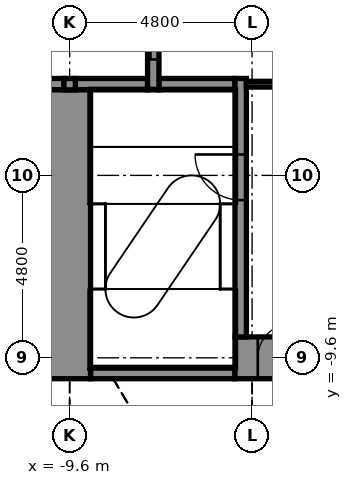
"""IFC4 building model, lengths in metres.
Left out: names, types, materials, properties, quantities, classifications, styles, units other than length and angle.
Written with IfcOpenShell. Run it as: python <this file> out.ifc"""

import sys

from ifc_helpers import new_model, si_unit, direction, frame, frame_2d, origin, place, context, subcontext, project, spatial, rectangle, extrude, element, fill, save


model = new_model("IFC4")
c1 = context("Model", 3, precision=1e-05, world=origin(), true_north=direction((0.0, 1.0)))
c2 = subcontext(c1, "Body", "Model", "MODEL_VIEW")
j1 = project(units=[si_unit("LENGTHUNIT", "METRE"), si_unit("PLANEANGLEUNIT", "RADIAN")], contexts=[c1])
p1 = place(None, origin())
s1 = spatial("IfcSite", under=j1, at=p1, CompositionType="ELEMENT")
p2 = place(p1, origin())
s2 = spatial("IfcBuilding", under=s1, at=p2, CompositionType="ELEMENT")
p3 = place(p2, frame((0.0, 0.0, 71.9)))
s3 = spatial("IfcBuildingStorey", under=s2, at=p3, CompositionType="ELEMENT", Elevation=71.9)
p4 = place(p3, frame((-9.05, -10.0, -0.3), z_axis=(0.0, 0.0, 1.0), x_axis=(1.0, 0.0, 0.0)))
e1 = element("IfcWall", 1, at=p4, inside=s3, PredefinedType="STANDARD", context=c2, shape_type="SweptSolid", body=[
    extrude(rectangle(XDim=3.8, YDim=0.3, at=frame_2d((1.9, 0.0))), origin(), (0.0, 0.0, 1.0), 6.1),
])
p5 = place(p3, frame((-5.25, -9.6, -0.3), z_axis=(0.0, 0.0, 1.0), x_axis=(1.0, 0.0, 0.0)))
e2 = element("IfcWall", 2, at=p5, inside=s3, PredefinedType="SHEAR", context=c2, shape_type="SweptSolid", body=[
    extrude(rectangle(XDim=10.2, YDim=1.1, at=frame_2d((5.1, 0.0))), origin(), (0.0, 0.0, 1.0), 6.1),
])
p6 = place(p5, frame((0.6, 0.0, 0.3)))
e3 = element("IfcOpeningElement", 3, at=p6, cuts=e2, PredefinedType="OPENING", context=c2, shape_type="SweptSolid", body=[
    extrude(rectangle(XDim=0.9, YDim=2.1, at=frame_2d((0.45, 1.05))), frame((0.0, 0.56, 0.0), z_axis=(0.0, -1.0, 0.0), x_axis=(1.0, 0.0, 0.0)), (0.0, 0.0, 1.0), 1.12),
])
p7 = place(p3, frame((-10.85, -2.4, -0.3), z_axis=(0.0, 0.0, 1.0), x_axis=(1.0, 0.0, 0.0)))
e4 = element("IfcWall", 4, at=p7, inside=s3, PredefinedType="STANDARD", context=c2, shape_type="SweptSolid", body=[
    extrude(rectangle(XDim=1.1, YDim=0.3, at=frame_2d((0.55, 0.0))), origin(), (0.0, 0.0, 1.0), 6.1),
])
p8 = place(p3, frame((-9.45, -2.4, -0.3), z_axis=(0.0, 0.0, 1.0), x_axis=(1.0, 0.0, 0.0)))
e5 = element("IfcWall", 5, at=p8, inside=s3, PredefinedType="STANDARD", context=c2, shape_type="SweptSolid", body=[
    extrude(rectangle(XDim=1.9, YDim=0.3, at=frame_2d((0.95, 0.0))), origin(), (0.0, 0.0, 1.0), 6.1),
])
p9 = place(p3, frame((-7.25, -2.4, -0.3), z_axis=(0.0, 0.0, 1.0), x_axis=(1.0, 0.0, 0.0)))
e6 = element("IfcWall", 6, at=p9, inside=s3, PredefinedType="STANDARD", context=c2, shape_type="SweptSolid", body=[
    extrude(rectangle(XDim=2.0, YDim=0.3, at=frame_2d((1.0, 0.0))), origin(), (0.0, 0.0, 1.0), 6.1),
])
p10 = place(p3, frame((-9.6, -10.15, -0.3), z_axis=(0.0, 0.0, 1.0), x_axis=(0.0, 1.0, 0.0)))
e7 = element("IfcWall", 7, at=p10, inside=s3, PredefinedType="SHEAR", context=c2, shape_type="SweptSolid", body=[
    extrude(rectangle(XDim=7.6, YDim=1.1, at=frame_2d((3.8, 0.0))), origin(), (0.0, 0.0, 1.0), 6.1),
])
p11 = place(p3, frame((-9.6, -2.55, -0.3), z_axis=(0.0, 0.0, 1.0), x_axis=(0.0, 1.0, 0.0)))
e8 = element("IfcWall", 8, at=p11, inside=s3, PredefinedType="STANDARD", context=c2, shape_type="SweptSolid", body=[
    extrude(rectangle(XDim=0.3, YDim=0.3, at=frame_2d((0.15, 0.0))), origin(), (0.0, 0.0, 1.0), 6.1),
])
p12 = place(p3, frame((-7.4, -2.55, -0.3), z_axis=(0.0, 0.0, 1.0), x_axis=(0.0, 1.0, 0.0)))
e9 = element("IfcWall", 9, at=p12, inside=s3, PredefinedType="STANDARD", context=c2, shape_type="SweptSolid", body=[
    extrude(rectangle(XDim=5.1, YDim=0.3, at=frame_2d((2.55, 0.0))), origin(), (0.0, 0.0, 1.0), 6.1),
])
p13 = place(p12, frame((0.8, 0.0, 0.3)))
e10 = element("IfcOpeningElement", 10, at=p13, cuts=e9, PredefinedType="OPENING", context=c2, shape_type="SweptSolid", body=[
    extrude(rectangle(XDim=1.1, YDim=2.1, at=frame_2d((0.55, 1.05))), frame((0.0, 0.16, 0.0), z_axis=(0.0, -1.0, 0.0), x_axis=(1.0, 0.0, 0.0)), (0.0, 0.0, 1.0), 0.32),
])
p14 = place(p12, frame((3.2, 0.0, 0.3)))
e11 = element("IfcOpeningElement", 11, at=p14, cuts=e9, PredefinedType="OPENING", context=c2, shape_type="SweptSolid", body=[
    extrude(rectangle(XDim=1.1, YDim=2.1, at=frame_2d((0.55, 1.05))), frame((0.0, 0.16, 0.0), z_axis=(0.0, -1.0, 0.0), x_axis=(1.0, 0.0, 0.0)), (0.0, 0.0, 1.0), 0.32),
])
p15 = place(p3, frame((-5.1, -9.05, -0.3), z_axis=(0.0, 0.0, 1.0), x_axis=(0.0, 1.0, 0.0)))
e12 = element("IfcWall", 12, at=p15, inside=s3, PredefinedType="STANDARD", context=c2, shape_type="SweptSolid", body=[
    extrude(rectangle(XDim=6.8, YDim=0.3, at=frame_2d((3.4, 0.0))), origin(), (0.0, 0.0, 1.0), 6.1),
])
p16 = place(p15, frame((3.6, 0.0, 0.3)))
e13 = element("IfcOpeningElement", 13, at=p16, cuts=e12, PredefinedType="OPENING", context=c2, shape_type="SweptSolid", body=[
    extrude(rectangle(XDim=1.2, YDim=2.1, at=frame_2d((0.6, 1.05))), frame((0.0, 0.16, 0.0), z_axis=(0.0, -1.0, 0.0), x_axis=(1.0, 0.0, 0.0)), (0.0, 0.0, 1.0), 0.32),
])
p17 = place(p3, frame((-4.95, -2.4, 0.0), z_axis=(0.0, 0.0, 1.0), x_axis=(1.0, 0.0, 0.0)))
e14 = element("IfcWall", 14, at=p17, inside=s3, PredefinedType="PARTITIONING", context=c2, shape_type="SweptSolid", body=[
    extrude(rectangle(XDim=1.2, YDim=0.15, at=frame_2d((0.6, 0.0))), origin(), (0.0, 0.0, 1.0), 5.8),
])
p18 = place(p13, origin())
e15 = element("IfcDoor", 15, at=p18, inside=s3, OperationType="DOUBLE_DOOR_SLIDING", PredefinedType="DOOR", context=c2, shape_type="SweptSolid", body=[
    extrude(rectangle(XDim=1.1, YDim=2.1, at=frame_2d((0.55, 1.05))), frame((0.0, 0.025, 0.0), z_axis=(0.0, -1.0, 0.0), x_axis=(1.0, 0.0, 0.0)), (0.0, 0.0, 1.0), 0.05),
])
fill(e10, e15)
p19 = place(p16, origin())
e16 = element("IfcDoor", 16, at=p19, inside=s3, OperationType="SINGLE_SWING_RIGHT", PredefinedType="DOOR", context=c2, shape_type="SweptSolid", body=[
    extrude(rectangle(XDim=1.2, YDim=2.1, at=frame_2d((0.6, 1.05))), frame((0.0, 0.025, 0.0), z_axis=(0.0, -1.0, 0.0), x_axis=(1.0, 0.0, 0.0)), (0.0, 0.0, 1.0), 0.05),
])
fill(e13, e16)
p20 = place(p6, origin())
e17 = element("IfcDoor", 17, at=p20, inside=s3, OperationType="SINGLE_SWING_RIGHT", PredefinedType="DOOR", context=c2, shape_type="SweptSolid", body=[
    extrude(rectangle(XDim=0.9, YDim=2.1, at=frame_2d((0.45, 1.05))), frame((0.0, 0.025, 0.0), z_axis=(0.0, -1.0, 0.0), x_axis=(1.0, 0.0, 0.0)), (0.0, 0.0, 1.0), 0.05),
])
fill(e3, e17)
save(model, sys.argv[1])
